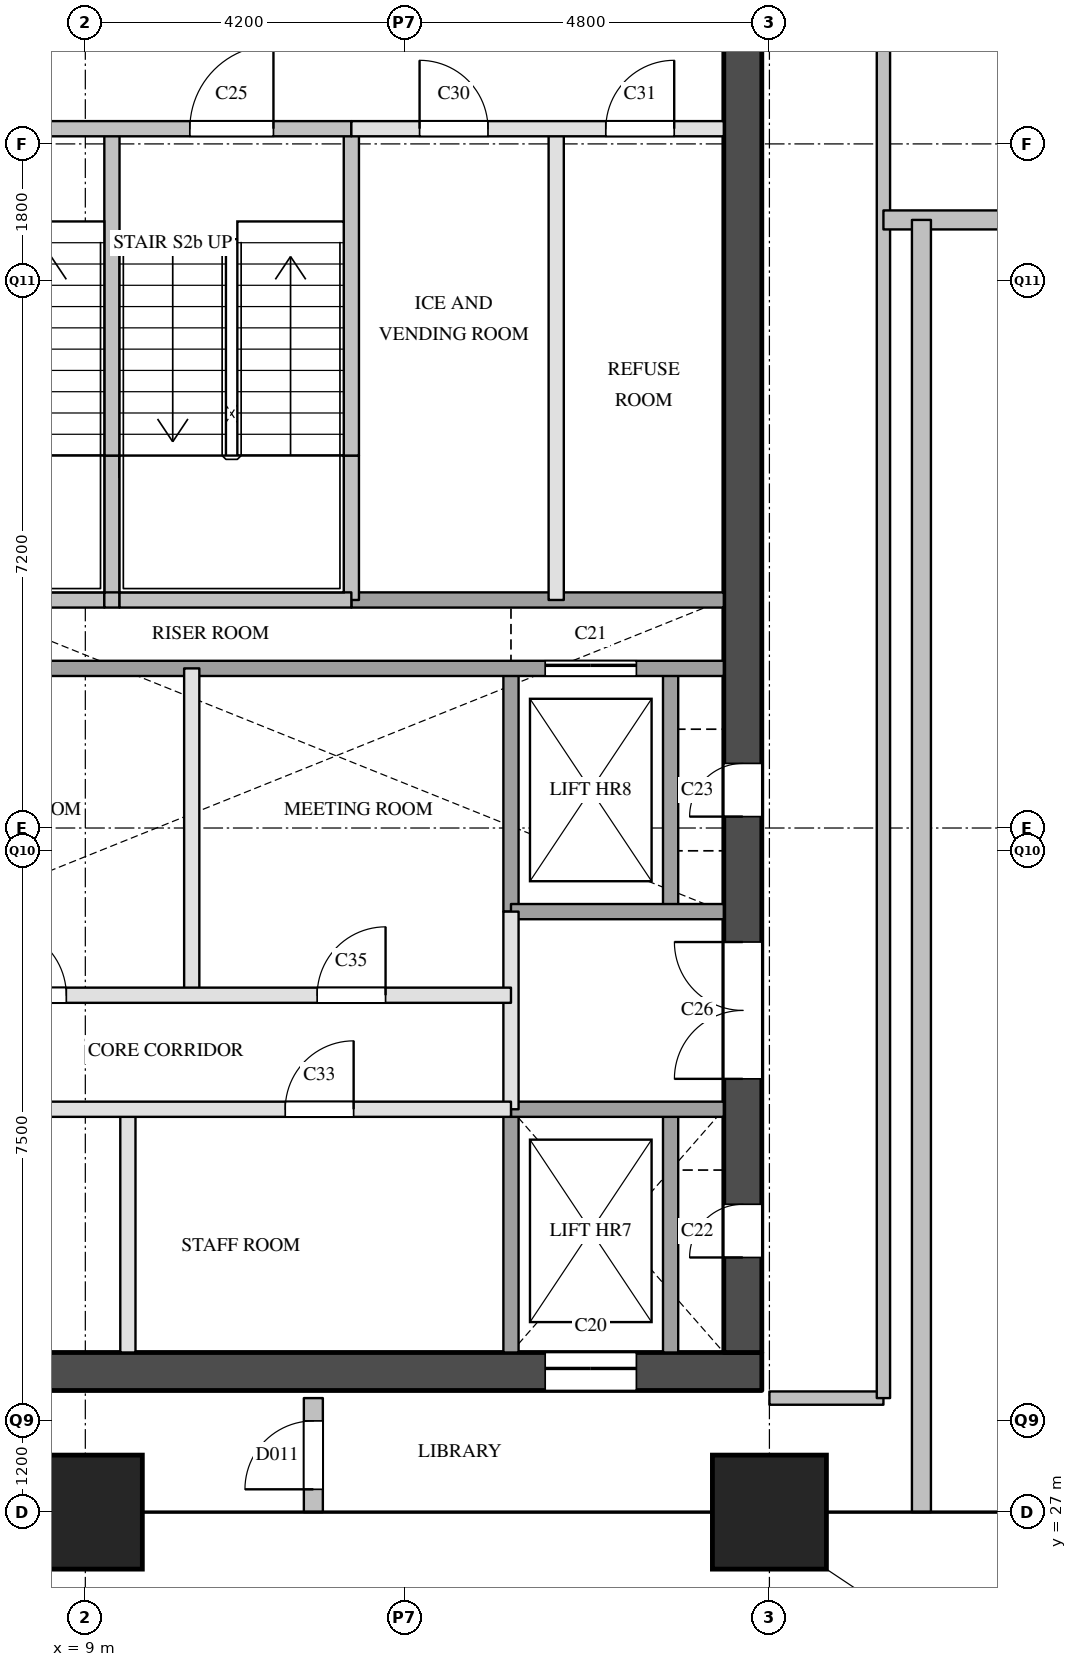
"""IFC4 building model, lengths in metres.
Left out: names, types, materials, properties, quantities, classifications, styles, units other than length and angle.
Written with IfcOpenShell. Run it as: python <this file> out.ifc"""

import sys

from ifc_helpers import new_model, si_unit, direction, frame, frame_2d, origin, origin_2d, place, context, subcontext, project, spatial, rectangle, extrude, element, fill, save


model = new_model("IFC4")
c1 = context("Model", 3, precision=1e-05, world=origin(), true_north=direction((0.0, 1.0)))
c2 = subcontext(c1, "Body", "Model", "MODEL_VIEW")
j1 = project(units=[si_unit("LENGTHUNIT", "METRE"), si_unit("PLANEANGLEUNIT", "RADIAN")], contexts=[c1])
p1 = place(None, origin())
s1 = spatial("IfcSite", under=j1, at=p1, CompositionType="ELEMENT")
p2 = place(p1, origin())
s2 = spatial("IfcBuilding", under=s1, at=p2, CompositionType="ELEMENT")
p3 = place(p2, frame((0.0, 0.0, 138.8)))
s3 = spatial("IfcBuildingStorey", under=s2, at=p3, CompositionType="ELEMENT", Elevation=138.8)
for number, where, z_axis, x_axis in (
    (1, (9.0, 27.0, 0.0), (0.0, 0.0, 1.0), (1.0, 0.0, 0.0)),
    (2, (18.0, 27.0, 0.0), (0.0, 0.0, 1.0), (1.0, 0.0, 0.0)),
):
    element("IfcColumn", number, at=place(p3, frame(where, z_axis=z_axis, x_axis=x_axis)), inside=s3, PredefinedType="COLUMN", context=c2, shape_type="SweptSolid", body=[
        extrude(rectangle(XDim=1.5, YDim=1.5, at=origin_2d()), origin(), (0.0, 0.0, 1.0), 3.9),
    ])
p4 = place(p3, frame((5.7, 28.85, 0.0), z_axis=(0.0, 0.0, 1.0), x_axis=(1.0, 0.0, 0.0)))
e3 = element("IfcWall", 3, at=p4, inside=s3, PredefinedType="SHEAR", context=c2, shape_type="SweptSolid", body=[
    extrude(rectangle(XDim=12.2, YDim=0.5, at=frame_2d((6.1, 0.0))), origin(), (0.0, 0.0, 1.0), 3.6),
])
p5 = place(p4, frame((9.35, 0.0, 0.0)))
e4 = element("IfcOpeningElement", 4, at=p5, cuts=e3, PredefinedType="OPENING", context=c2, shape_type="SweptSolid", body=[
    extrude(rectangle(XDim=1.2, YDim=2.1, at=frame_2d((0.6, 1.05))), frame((0.0, 0.26, 0.0), z_axis=(0.0, -1.0, 0.0), x_axis=(1.0, 0.0, 0.0)), (0.0, 0.0, 1.0), 0.52),
])
p6 = place(p3, frame((17.65, 29.1, 0.0), z_axis=(0.0, 0.0, 1.0), x_axis=(0.0, 1.0, 0.0)))
e5 = element("IfcWall", 5, at=p6, inside=s3, PredefinedType="SHEAR", context=c2, shape_type="SweptSolid", body=[
    extrude(rectangle(XDim=20.3, YDim=0.5, at=frame_2d((10.15, 0.0))), origin(), (0.0, 0.0, 1.0), 3.6),
])
p7 = place(p6, frame((1.25, 0.0, 0.0)))
e6 = element("IfcOpeningElement", 6, at=p7, cuts=e5, PredefinedType="OPENING", context=c2, shape_type="SweptSolid", body=[
    extrude(rectangle(XDim=0.7, YDim=2.1, at=frame_2d((0.35, 1.05))), frame((0.0, 0.26, 0.0), z_axis=(0.0, -1.0, 0.0), x_axis=(1.0, 0.0, 0.0)), (0.0, 0.0, 1.0), 0.52),
])
p8 = place(p6, frame((7.05, 0.0, 0.0)))
e7 = element("IfcOpeningElement", 7, at=p8, cuts=e5, PredefinedType="OPENING", context=c2, shape_type="SweptSolid", body=[
    extrude(rectangle(XDim=0.7, YDim=2.1, at=frame_2d((0.35, 1.05))), frame((0.0, 0.26, 0.0), z_axis=(0.0, -1.0, 0.0), x_axis=(1.0, 0.0, 0.0)), (0.0, 0.0, 1.0), 0.52),
])
p9 = place(p6, frame((3.6, 0.0, 0.0)))
e8 = element("IfcOpeningElement", 8, at=p9, cuts=e5, PredefinedType="OPENING", context=c2, shape_type="SweptSolid", body=[
    extrude(rectangle(XDim=1.8, YDim=2.1, at=frame_2d((0.9, 1.05))), frame((0.0, 0.26, 0.0), z_axis=(0.0, -1.0, 0.0), x_axis=(1.0, 0.0, 0.0)), (0.0, 0.0, 1.0), 0.52),
])
p10 = place(p3, frame((9.35, 39.0, 0.0), z_axis=(0.0, 0.0, 1.0), x_axis=(0.0, 1.0, 0.0)))
e9 = element("IfcWall", 9, at=p10, inside=s3, PredefinedType="SOLIDWALL", context=c2, shape_type="SweptSolid", body=[
    extrude(rectangle(XDim=1.9, YDim=0.2, at=frame_2d((0.95, 0.0))), origin(), (0.0, 0.0, 1.0), 3.6),
])
p11 = place(p3, frame((9.35, 40.9, 0.0), z_axis=(0.0, 0.0, 1.0), x_axis=(0.0, 1.0, 0.0)))
e10 = element("IfcWall", 10, at=p11, inside=s3, PredefinedType="SOLIDWALL", context=c2, shape_type="SweptSolid", body=[
    extrude(rectangle(XDim=4.3, YDim=0.2, at=frame_2d((2.15, 0.0))), origin(), (0.0, 0.0, 1.0), 3.6),
])
p12 = place(p3, frame((9.56, 29.1, 0.0), z_axis=(0.0, 0.0, 1.0), x_axis=(0.0, 1.0, 0.0)))
e11 = element("IfcWall", 11, at=p12, inside=s3, PredefinedType="PARTITIONING", context=c2, shape_type="SweptSolid", body=[
    extrude(rectangle(XDim=3.2, YDim=0.2, at=frame_2d((1.6, 0.0))), origin(), (0.0, 0.0, 1.0), 3.6),
])
p13 = place(p3, frame((10.4, 33.8, 0.0), z_axis=(0.0, 0.0, 1.0), x_axis=(0.0, 1.0, 0.0)))
e12 = element("IfcWall", 12, at=p13, inside=s3, PredefinedType="PARTITIONING", context=c2, shape_type="SweptSolid", body=[
    extrude(rectangle(XDim=4.3, YDim=0.2, at=frame_2d((2.15, 0.0))), origin(), (0.0, 0.0, 1.0), 3.6),
])
p14 = place(p3, frame((12.5, 39.0, 0.0), z_axis=(0.0, 0.0, 1.0), x_axis=(0.0, 1.0, 0.0)))
e13 = element("IfcWall", 13, at=p14, inside=s3, PredefinedType="SOLIDWALL", context=c2, shape_type="SweptSolid", body=[
    extrude(rectangle(XDim=1.9, YDim=0.2, at=frame_2d((0.95, 0.0))), origin(), (0.0, 0.0, 1.0), 3.6),
])
p15 = place(p3, frame((12.5, 40.9, 0.0), z_axis=(0.0, 0.0, 1.0), x_axis=(0.0, 1.0, 0.0)))
e14 = element("IfcWall", 14, at=p15, inside=s3, PredefinedType="SOLIDWALL", context=c2, shape_type="SweptSolid", body=[
    extrude(rectangle(XDim=4.3, YDim=0.2, at=frame_2d((2.15, 0.0))), origin(), (0.0, 0.0, 1.0), 3.6),
])
p16 = place(p3, frame((14.6, 32.3, 0.0), z_axis=(0.0, 0.0, 1.0), x_axis=(0.0, 1.0, 0.0)))
e15 = element("IfcWall", 15, at=p16, inside=s3, PredefinedType="PARTITIONING", context=c2, shape_type="SweptSolid", body=[
    extrude(rectangle(XDim=2.6, YDim=0.2, at=frame_2d((1.3, 0.0))), origin(), (0.0, 0.0, 1.0), 3.6),
])
p17 = place(p3, frame((14.6, 29.1, 0.0), z_axis=(0.0, 0.0, 1.0), x_axis=(0.0, 1.0, 0.0)))
e16 = element("IfcWall", 16, at=p17, inside=s3, PredefinedType="SOLIDWALL", context=c2, shape_type="SweptSolid", body=[
    extrude(rectangle(XDim=3.2, YDim=0.2, at=frame_2d((1.6, 0.0))), origin(), (0.0, 0.0, 1.0), 3.6),
])
p18 = place(p3, frame((14.6, 34.9, 0.0), z_axis=(0.0, 0.0, 1.0), x_axis=(0.0, 1.0, 0.0)))
e17 = element("IfcWall", 17, at=p18, inside=s3, PredefinedType="SOLIDWALL", context=c2, shape_type="SweptSolid", body=[
    extrude(rectangle(XDim=3.2, YDim=0.2, at=frame_2d((1.6, 0.0))), origin(), (0.0, 0.0, 1.0), 3.6),
])
p19 = place(p3, frame((15.195, 39.0, 0.0), z_axis=(0.0, 0.0, 1.0), x_axis=(0.0, 1.0, 0.0)))
e18 = element("IfcWall", 18, at=p19, inside=s3, PredefinedType="PARTITIONING", context=c2, shape_type="SweptSolid", body=[
    extrude(rectangle(XDim=6.2, YDim=0.2, at=frame_2d((3.1, 0.0))), origin(), (0.0, 0.0, 1.0), 3.6),
])
p20 = place(p3, frame((16.7, 29.1, 0.0), z_axis=(0.0, 0.0, 1.0), x_axis=(0.0, 1.0, 0.0)))
e19 = element("IfcWall", 19, at=p20, inside=s3, PredefinedType="SOLIDWALL", context=c2, shape_type="SweptSolid", body=[
    extrude(rectangle(XDim=3.2, YDim=0.2, at=frame_2d((1.6, 0.0))), origin(), (0.0, 0.0, 1.0), 3.6),
])
p21 = place(p3, frame((16.7, 34.9, 0.0), z_axis=(0.0, 0.0, 1.0), x_axis=(0.0, 1.0, 0.0)))
e20 = element("IfcWall", 20, at=p21, inside=s3, PredefinedType="SOLIDWALL", context=c2, shape_type="SweptSolid", body=[
    extrude(rectangle(XDim=3.2, YDim=0.2, at=frame_2d((1.6, 0.0))), origin(), (0.0, 0.0, 1.0), 3.6),
])
p22 = place(p3, frame((6.2, 32.3, 0.0), z_axis=(0.0, 0.0, 1.0), x_axis=(1.0, 0.0, 0.0)))
e21 = element("IfcWall", 21, at=p22, inside=s3, PredefinedType="PARTITIONING", context=c2, shape_type="SweptSolid", body=[
    extrude(rectangle(XDim=8.4, YDim=0.2, at=frame_2d((4.2, 0.0))), origin(), (0.0, 0.0, 1.0), 3.6),
])
p23 = place(p22, frame((1.23, 0.0, 0.0)))
e22 = element("IfcOpeningElement", 22, at=p23, cuts=e21, PredefinedType="OPENING", context=c2, shape_type="SweptSolid", body=[
    extrude(rectangle(XDim=0.9, YDim=2.1, at=frame_2d((0.45, 1.05))), frame((0.0, 0.11, 0.0), z_axis=(0.0, -1.0, 0.0), x_axis=(1.0, 0.0, 0.0)), (0.0, 0.0, 1.0), 0.22),
])
p24 = place(p22, frame((5.43, 0.0, 0.0)))
e23 = element("IfcOpeningElement", 23, at=p24, cuts=e21, PredefinedType="OPENING", context=c2, shape_type="SweptSolid", body=[
    extrude(rectangle(XDim=0.9, YDim=2.1, at=frame_2d((0.45, 1.05))), frame((0.0, 0.11, 0.0), z_axis=(0.0, -1.0, 0.0), x_axis=(1.0, 0.0, 0.0)), (0.0, 0.0, 1.0), 0.22),
])
p25 = place(p3, frame((14.6, 32.3, 0.0), z_axis=(0.0, 0.0, 1.0), x_axis=(1.0, 0.0, 0.0)))
e24 = element("IfcWall", 24, at=p25, inside=s3, PredefinedType="SOLIDWALL", context=c2, shape_type="SweptSolid", body=[
    extrude(rectangle(XDim=2.8, YDim=0.2, at=frame_2d((1.4, 0.0))), origin(), (0.0, 0.0, 1.0), 3.6),
])
p26 = place(p3, frame((6.2, 33.8, 0.0), z_axis=(0.0, 0.0, 1.0), x_axis=(1.0, 0.0, 0.0)))
e25 = element("IfcWall", 25, at=p26, inside=s3, PredefinedType="PARTITIONING", context=c2, shape_type="SweptSolid", body=[
    extrude(rectangle(XDim=8.4, YDim=0.2, at=frame_2d((4.2, 0.0))), origin(), (0.0, 0.0, 1.0), 3.6),
])
p27 = place(p26, frame((1.65, 0.0, 0.0)))
e26 = element("IfcOpeningElement", 26, at=p27, cuts=e25, PredefinedType="OPENING", context=c2, shape_type="SweptSolid", body=[
    extrude(rectangle(XDim=0.9, YDim=2.1, at=frame_2d((0.45, 1.05))), frame((0.0, 0.11, 0.0), z_axis=(0.0, -1.0, 0.0), x_axis=(1.0, 0.0, 0.0)), (0.0, 0.0, 1.0), 0.22),
])
p28 = place(p26, frame((5.85, 0.0, 0.0)))
e27 = element("IfcOpeningElement", 27, at=p28, cuts=e25, PredefinedType="OPENING", context=c2, shape_type="SweptSolid", body=[
    extrude(rectangle(XDim=0.9, YDim=2.1, at=frame_2d((0.45, 1.05))), frame((0.0, 0.11, 0.0), z_axis=(0.0, -1.0, 0.0), x_axis=(1.0, 0.0, 0.0)), (0.0, 0.0, 1.0), 0.22),
])
p29 = place(p3, frame((14.6, 34.9, 0.0), z_axis=(0.0, 0.0, 1.0), x_axis=(1.0, 0.0, 0.0)))
e28 = element("IfcWall", 28, at=p29, inside=s3, PredefinedType="SOLIDWALL", context=c2, shape_type="SweptSolid", body=[
    extrude(rectangle(XDim=2.8, YDim=0.2, at=frame_2d((1.4, 0.0))), origin(), (0.0, 0.0, 1.0), 3.6),
])
p30 = place(p3, frame((6.2, 38.1, 0.0), z_axis=(0.0, 0.0, 1.0), x_axis=(1.0, 0.0, 0.0)))
e29 = element("IfcWall", 29, at=p30, inside=s3, PredefinedType="SOLIDWALL", context=c2, shape_type="SweptSolid", body=[
    extrude(rectangle(XDim=11.2, YDim=0.2, at=frame_2d((5.6, 0.0))), origin(), (0.0, 0.0, 1.0), 3.6),
])
p31 = place(p30, frame((8.85, 0.0, 0.0)))
e30 = element("IfcOpeningElement", 30, at=p31, cuts=e29, PredefinedType="OPENING", context=c2, shape_type="SweptSolid", body=[
    extrude(rectangle(XDim=1.2, YDim=2.1, at=frame_2d((0.6, 1.05))), frame((0.0, 0.11, 0.0), z_axis=(0.0, -1.0, 0.0), x_axis=(1.0, 0.0, 0.0)), (0.0, 0.0, 1.0), 0.22),
])
p32 = place(p3, frame((12.5, 39.0, 0.0), z_axis=(0.0, 0.0, 1.0), x_axis=(1.0, 0.0, 0.0)))
e31 = element("IfcWall", 31, at=p32, inside=s3, PredefinedType="SOLIDWALL", context=c2, shape_type="SweptSolid", body=[
    extrude(rectangle(XDim=4.9, YDim=0.2, at=frame_2d((2.45, 0.0))), origin(), (0.0, 0.0, 1.0), 3.6),
])
p33 = place(p3, frame((6.2, 39.0, 0.0), z_axis=(0.0, 0.0, 1.0), x_axis=(1.0, 0.0, 0.0)))
e32 = element("IfcWall", 32, at=p33, inside=s3, PredefinedType="SOLIDWALL", context=c2, shape_type="SweptSolid", body=[
    extrude(rectangle(XDim=3.05, YDim=0.2, at=frame_2d((1.525, 0.0))), origin(), (0.0, 0.0, 1.0), 3.6),
])
p34 = place(p3, frame((9.25, 39.0, 0.0), z_axis=(0.0, 0.0, 1.0), x_axis=(1.0, 0.0, 0.0)))
e33 = element("IfcWall", 33, at=p34, inside=s3, PredefinedType="SOLIDWALL", context=c2, shape_type="SweptSolid", body=[
    extrude(rectangle(XDim=0.2, YDim=0.2, at=frame_2d((0.1, 0.0))), origin(), (0.0, 0.0, 1.0), 3.6),
])
p35 = place(p3, frame((9.45, 39.0, 0.0), z_axis=(0.0, 0.0, 1.0), x_axis=(1.0, 0.0, 0.0)))
e34 = element("IfcWall", 34, at=p35, inside=s3, PredefinedType="SOLIDWALL", context=c2, shape_type="SweptSolid", body=[
    extrude(rectangle(XDim=3.05, YDim=0.2, at=frame_2d((1.525, 0.0))), origin(), (0.0, 0.0, 1.0), 3.6),
])
p36 = place(p3, frame((12.5, 45.2, 0.0), z_axis=(0.0, 0.0, 1.0), x_axis=(1.0, 0.0, 0.0)))
e35 = element("IfcWall", 35, at=p36, inside=s3, PredefinedType="PARTITIONING", context=c2, shape_type="SweptSolid", body=[
    extrude(rectangle(XDim=4.9, YDim=0.2, at=frame_2d((2.45, 0.0))), origin(), (0.0, 0.0, 1.0), 3.6),
])
p37 = place(p36, frame((0.897, 0.0, 0.0)))
e36 = element("IfcOpeningElement", 36, at=p37, cuts=e35, PredefinedType="OPENING", context=c2, shape_type="SweptSolid", body=[
    extrude(rectangle(XDim=0.9, YDim=2.1, at=frame_2d((0.45, 1.05))), frame((0.0, 0.11, 0.0), z_axis=(0.0, -1.0, 0.0), x_axis=(1.0, 0.0, 0.0)), (0.0, 0.0, 1.0), 0.22),
])
p38 = place(p36, frame((3.347, 0.0, 0.0)))
e37 = element("IfcOpeningElement", 37, at=p38, cuts=e35, PredefinedType="OPENING", context=c2, shape_type="SweptSolid", body=[
    extrude(rectangle(XDim=0.9, YDim=2.1, at=frame_2d((0.45, 1.05))), frame((0.0, 0.11, 0.0), z_axis=(0.0, -1.0, 0.0), x_axis=(1.0, 0.0, 0.0)), (0.0, 0.0, 1.0), 0.22),
])
p39 = place(p3, frame((6.2, 45.2, 0.0), z_axis=(0.0, 0.0, 1.0), x_axis=(1.0, 0.0, 0.0)))
e38 = element("IfcWall", 38, at=p39, inside=s3, PredefinedType="SOLIDWALL", context=c2, shape_type="SweptSolid", body=[
    extrude(rectangle(XDim=6.3, YDim=0.2, at=frame_2d((3.15, 0.0))), origin(), (0.0, 0.0, 1.0), 3.6),
])
p40 = place(p39, frame((1.025, 0.0, 0.0)))
e39 = element("IfcOpeningElement", 39, at=p40, cuts=e38, PredefinedType="OPENING", context=c2, shape_type="SweptSolid", body=[
    extrude(rectangle(XDim=1.1, YDim=2.1, at=frame_2d((0.55, 1.05))), frame((0.0, 0.11, 0.0), z_axis=(0.0, -1.0, 0.0), x_axis=(1.0, 0.0, 0.0)), (0.0, 0.0, 1.0), 0.22),
])
p41 = place(p39, frame((4.175, 0.0, 0.0)))
e40 = element("IfcOpeningElement", 40, at=p41, cuts=e38, PredefinedType="OPENING", context=c2, shape_type="SweptSolid", body=[
    extrude(rectangle(XDim=1.1, YDim=2.1, at=frame_2d((0.55, 1.05))), frame((0.0, 0.11, 0.0), z_axis=(0.0, -1.0, 0.0), x_axis=(1.0, 0.0, 0.0)), (0.0, 0.0, 1.0), 0.22),
])
p42 = place(p3, frame((18.0, 28.5, 0.0), z_axis=(0.0, 0.0, 1.0), x_axis=(1.0, 0.0, 0.0)))
e41 = element("IfcWall", 41, at=p42, inside=s3, PredefinedType="PARTITIONING", context=c2, shape_type="SweptSolid", body=[
    extrude(rectangle(XDim=1.5, YDim=0.175, at=frame_2d((0.75, 0.0))), origin(), (0.0, 0.0, 1.0), 3.6),
])
p43 = place(p3, frame((19.5, 28.5, 0.0), z_axis=(0.0, 0.0, 1.0), x_axis=(0.0, 1.0, 0.0)))
e42 = element("IfcWall", 42, at=p43, inside=s3, PredefinedType="PARTITIONING", context=c2, shape_type="SweptSolid", body=[
    extrude(rectangle(XDim=23.0, YDim=0.175, at=frame_2d((11.5, 0.0))), origin(), (0.0, 0.0, 1.0), 3.6),
])
p44 = place(p3, frame((19.5, 44.0, 0.0), z_axis=(0.0, 0.0, 1.0), x_axis=(1.0, 0.0, 0.0)))
e43 = element("IfcWall", 43, at=p44, inside=s3, PredefinedType="PARTITIONING", context=c2, shape_type="SweptSolid", body=[
    extrude(rectangle(XDim=15.0, YDim=0.25, at=frame_2d((7.5, 0.0))), origin(), (0.0, 0.0, 1.0), 2.6),
])
p45 = place(p3, frame((12.0, 27.0, 0.0), z_axis=(0.0, 0.0, 1.0), x_axis=(0.0, 1.0, 0.0)))
e44 = element("IfcWall", 44, at=p45, inside=s3, PredefinedType="PARTITIONING", context=c2, shape_type="SweptSolid", body=[
    extrude(rectangle(XDim=1.5, YDim=0.25, at=frame_2d((0.75, 0.0))), origin(), (0.0, 0.0, 1.0), 2.6),
])
p46 = place(p45, frame((0.3, 0.0, 0.0)))
e45 = element("IfcOpeningElement", 45, at=p46, cuts=e44, PredefinedType="OPENING", context=c2, shape_type="SweptSolid", body=[
    extrude(rectangle(XDim=0.9, YDim=2.1, at=frame_2d((0.45, 1.05))), frame((0.0, 0.135, 0.0), z_axis=(0.0, -1.0, 0.0), x_axis=(1.0, 0.0, 0.0)), (0.0, 0.0, 1.0), 0.27),
])
p47 = place(p3, frame((20.0, 27.0, 0.0), z_axis=(0.0, 0.0, 1.0), x_axis=(0.0, 1.0, 0.0)))
e46 = element("IfcWall", 46, at=p47, inside=s3, PredefinedType="PARTITIONING", context=c2, shape_type="SweptSolid", body=[
    extrude(rectangle(XDim=17.0, YDim=0.25, at=frame_2d((8.5, 0.0))), origin(), (0.0, 0.0, 1.0), 2.6),
])
p48 = place(p5, origin())
e47 = element("IfcDoor", 47, at=p48, inside=s3, OperationType="SLIDING_TO_LEFT", PredefinedType="DOOR", context=c2, shape_type="SweptSolid", body=[
    extrude(rectangle(XDim=1.2, YDim=2.1, at=frame_2d((0.6, 1.05))), frame((0.0, 0.025, 0.0), z_axis=(0.0, -1.0, 0.0), x_axis=(1.0, 0.0, 0.0)), (0.0, 0.0, 1.0), 0.05),
])
fill(e4, e47)
p49 = place(p31, origin())
e48 = element("IfcDoor", 48, at=p49, inside=s3, OperationType="SLIDING_TO_LEFT", PredefinedType="DOOR", context=c2, shape_type="SweptSolid", body=[
    extrude(rectangle(XDim=1.2, YDim=2.1, at=frame_2d((0.6, 1.05))), frame((0.0, 0.025, 0.0), z_axis=(0.0, -1.0, 0.0), x_axis=(1.0, 0.0, 0.0)), (0.0, 0.0, 1.0), 0.05),
])
fill(e30, e48)
p50 = place(p7, origin())
e49 = element("IfcDoor", 49, at=p50, inside=s3, OperationType="SINGLE_SWING_LEFT", PredefinedType="DOOR", context=c2, shape_type="SweptSolid", body=[
    extrude(rectangle(XDim=0.7, YDim=2.1, at=frame_2d((0.35, 1.05))), frame((0.0, 0.025, 0.0), z_axis=(0.0, -1.0, 0.0), x_axis=(1.0, 0.0, 0.0)), (0.0, 0.0, 1.0), 0.05),
])
fill(e6, e49)
p51 = place(p8, origin())
e50 = element("IfcDoor", 50, at=p51, inside=s3, OperationType="SINGLE_SWING_LEFT", PredefinedType="DOOR", context=c2, shape_type="SweptSolid", body=[
    extrude(rectangle(XDim=0.7, YDim=2.1, at=frame_2d((0.35, 1.05))), frame((0.0, 0.025, 0.0), z_axis=(0.0, -1.0, 0.0), x_axis=(1.0, 0.0, 0.0)), (0.0, 0.0, 1.0), 0.05),
])
fill(e7, e50)
p52 = place(p41, origin())
e51 = element("IfcDoor", 51, at=p52, inside=s3, OperationType="SINGLE_SWING_RIGHT", PredefinedType="DOOR", context=c2, shape_type="SweptSolid", body=[
    extrude(rectangle(XDim=1.1, YDim=2.1, at=frame_2d((0.55, 1.05))), frame((0.0, 0.025, 0.0), z_axis=(0.0, -1.0, 0.0), x_axis=(1.0, 0.0, 0.0)), (0.0, 0.0, 1.0), 0.05),
])
fill(e40, e51)
p53 = place(p9, origin())
e52 = element("IfcDoor", 52, at=p53, inside=s3, OperationType="DOUBLE_DOOR_SINGLE_SWING", PredefinedType="DOOR", context=c2, shape_type="SweptSolid", body=[
    extrude(rectangle(XDim=1.8, YDim=2.1, at=frame_2d((0.9, 1.05))), frame((0.0, 0.025, 0.0), z_axis=(0.0, -1.0, 0.0), x_axis=(1.0, 0.0, 0.0)), (0.0, 0.0, 1.0), 0.05),
])
fill(e8, e52)
p54 = place(p37, origin())
e53 = element("IfcDoor", 53, at=p54, inside=s3, OperationType="SINGLE_SWING_LEFT", PredefinedType="DOOR", context=c2, shape_type="SweptSolid", body=[
    extrude(rectangle(XDim=0.9, YDim=2.1, at=frame_2d((0.45, 1.05))), frame((0.0, 0.025, 0.0), z_axis=(0.0, -1.0, 0.0), x_axis=(1.0, 0.0, 0.0)), (0.0, 0.0, 1.0), 0.05),
])
fill(e36, e53)
p55 = place(p38, origin())
e54 = element("IfcDoor", 54, at=p55, inside=s3, OperationType="SINGLE_SWING_RIGHT", PredefinedType="DOOR", context=c2, shape_type="SweptSolid", body=[
    extrude(rectangle(XDim=0.9, YDim=2.1, at=frame_2d((0.45, 1.05))), frame((0.0, 0.025, 0.0), z_axis=(0.0, -1.0, 0.0), x_axis=(1.0, 0.0, 0.0)), (0.0, 0.0, 1.0), 0.05),
])
fill(e37, e54)
p56 = place(p24, origin())
e55 = element("IfcDoor", 55, at=p56, inside=s3, OperationType="SINGLE_SWING_RIGHT", PredefinedType="DOOR", context=c2, shape_type="SweptSolid", body=[
    extrude(rectangle(XDim=0.9, YDim=2.1, at=frame_2d((0.45, 1.05))), frame((0.0, 0.025, 0.0), z_axis=(0.0, -1.0, 0.0), x_axis=(1.0, 0.0, 0.0)), (0.0, 0.0, 1.0), 0.05),
])
fill(e23, e55)
p57 = place(p27, origin())
e56 = element("IfcDoor", 56, at=p57, inside=s3, OperationType="SINGLE_SWING_LEFT", PredefinedType="DOOR", context=c2, shape_type="SweptSolid", body=[
    extrude(rectangle(XDim=0.9, YDim=2.1, at=frame_2d((0.45, 1.05))), frame((0.0, 0.025, 0.0), z_axis=(0.0, -1.0, 0.0), x_axis=(1.0, 0.0, 0.0)), (0.0, 0.0, 1.0), 0.05),
])
fill(e26, e56)
p58 = place(p28, origin())
e57 = element("IfcDoor", 57, at=p58, inside=s3, OperationType="SINGLE_SWING_RIGHT", PredefinedType="DOOR", context=c2, shape_type="SweptSolid", body=[
    extrude(rectangle(XDim=0.9, YDim=2.1, at=frame_2d((0.45, 1.05))), frame((0.0, 0.025, 0.0), z_axis=(0.0, -1.0, 0.0), x_axis=(1.0, 0.0, 0.0)), (0.0, 0.0, 1.0), 0.05),
])
fill(e27, e57)
p59 = place(p46, origin())
e58 = element("IfcDoor", 58, at=p59, inside=s3, OperationType="SINGLE_SWING_LEFT", PredefinedType="DOOR", context=c2, shape_type="SweptSolid", body=[
    extrude(rectangle(XDim=0.9, YDim=2.1, at=frame_2d((0.45, 1.05))), frame((0.0, 0.025, 0.0), z_axis=(0.0, -1.0, 0.0), x_axis=(1.0, 0.0, 0.0)), (0.0, 0.0, 1.0), 0.05),
])
fill(e45, e58)
save(model, sys.argv[1])
